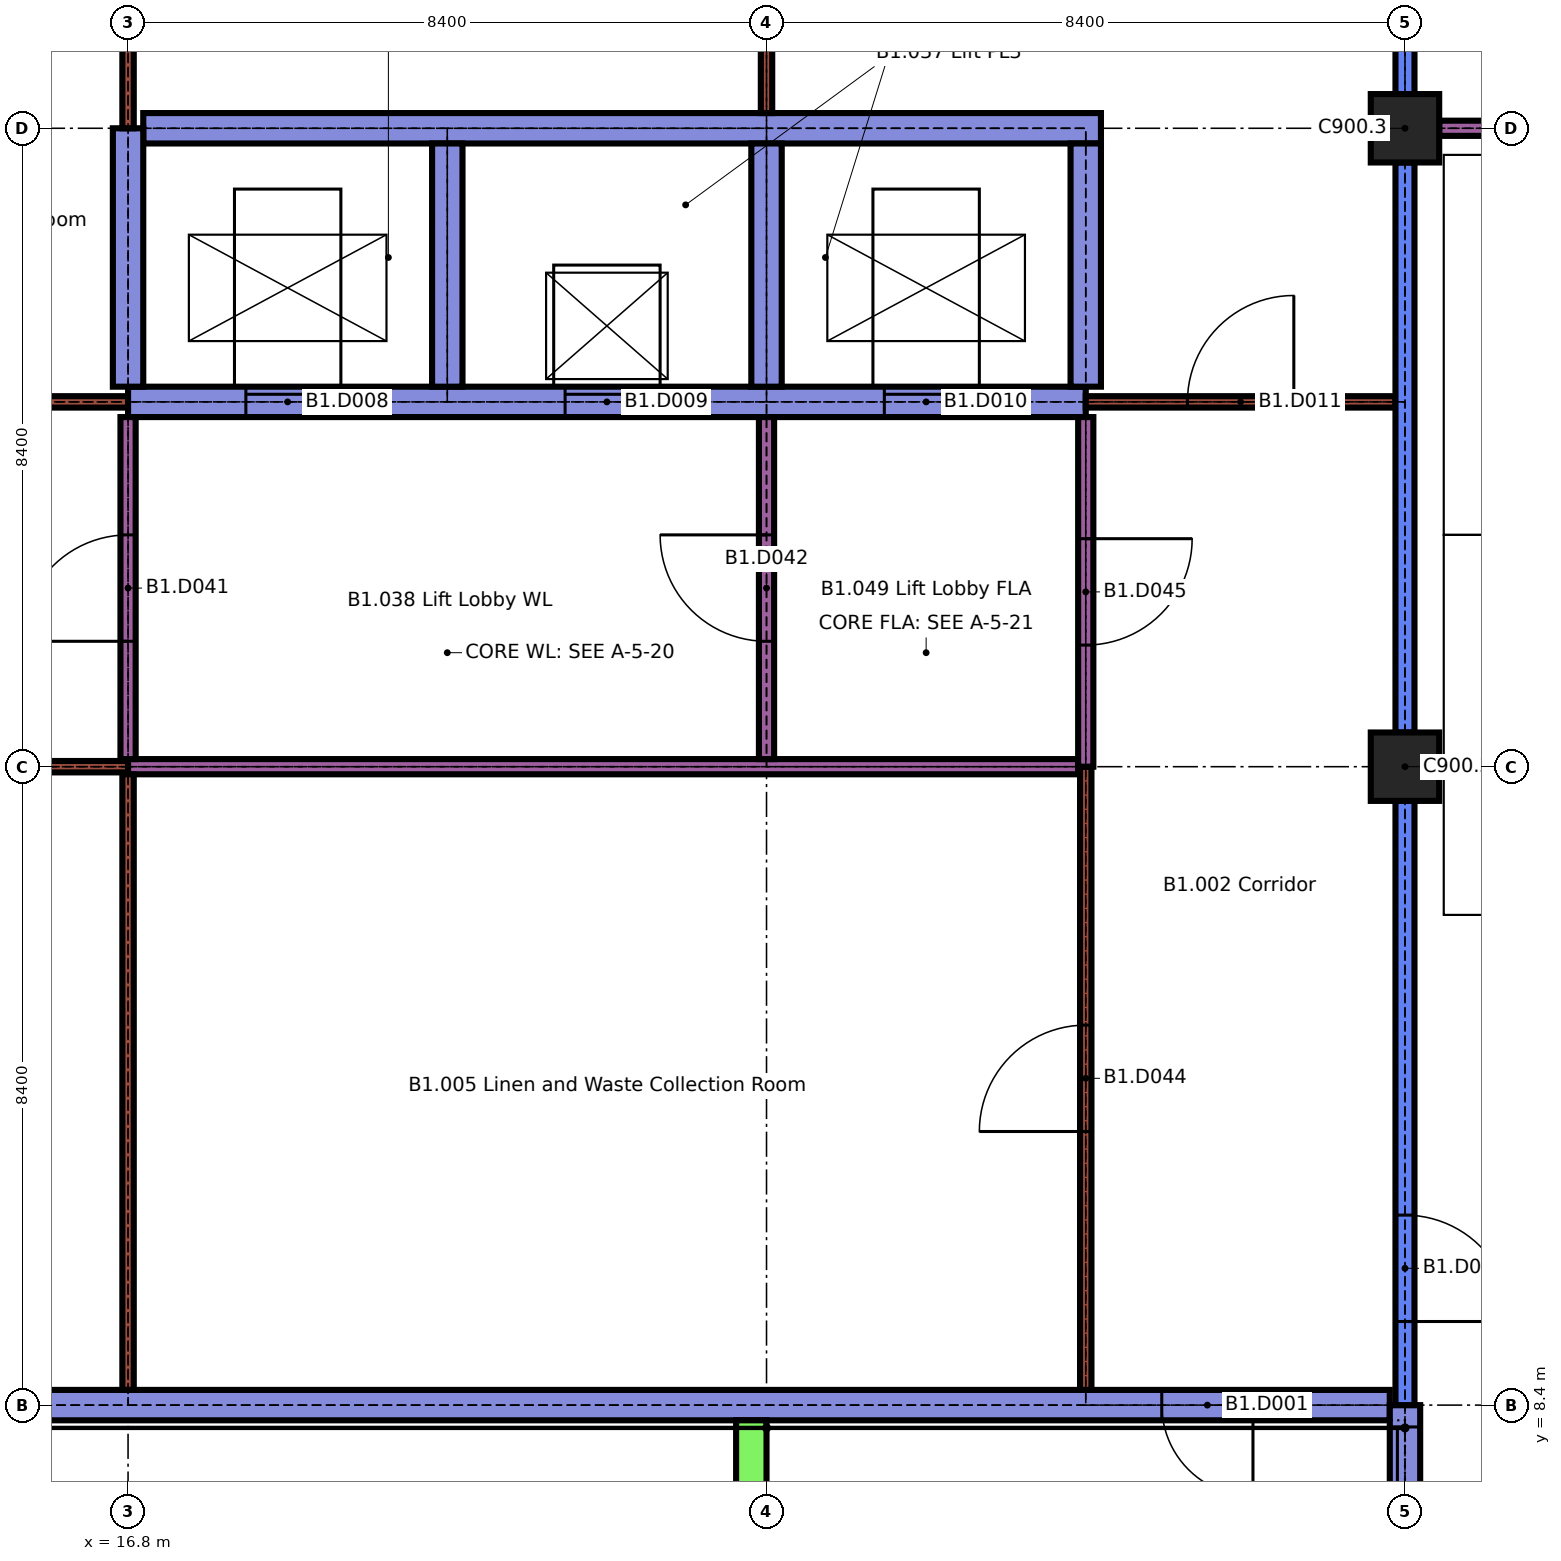
"""IFC4 building model, lengths in metres.
Left out: names, types, materials, properties, quantities, classifications, styles, units other than length and angle.
Written with IfcOpenShell. Run it as: python <this file> out.ifc"""

import sys

from ifc_helpers import new_model, si_unit, direction, frame, frame_2d, origin, origin_2d, place, context, subcontext, project, spatial, rectangle, extrude, element, fill, save


model = new_model("IFC4")
c1 = context("Model", 3, precision=1e-05, world=origin(), true_north=direction((0.0, 1.0)))
c2 = subcontext(c1, "Body", "Model", "MODEL_VIEW")
j1 = project(units=[si_unit("LENGTHUNIT", "METRE"), si_unit("PLANEANGLEUNIT", "RADIAN")], contexts=[c1])
p1 = place(None, origin())
s1 = spatial("IfcSite", under=j1, at=p1, CompositionType="ELEMENT")
p2 = place(p1, origin())
s2 = spatial("IfcBuilding", under=s1, at=p2, CompositionType="ELEMENT")
p3 = place(p2, frame((0.0, 0.0, -4.2)))
s3 = spatial("IfcBuildingStorey", under=s2, at=p3, CompositionType="ELEMENT", Elevation=-4.2)
for number, where, z_axis, x_axis in (
    (1, (33.6, 16.8, 0.0), (0.0, 0.0, 1.0), (1.0, 0.0, 0.0)),
    (2, (33.6, 25.2, 0.0), (0.0, 0.0, 1.0), (1.0, 0.0, 0.0)),
):
    element("IfcColumn", number, at=place(p3, frame(where, z_axis=z_axis, x_axis=x_axis)), inside=s3, PredefinedType="COLUMN", context=c2, shape_type="SweptSolid", body=[
        extrude(rectangle(XDim=0.9, YDim=0.9, at=origin_2d()), origin(), (0.0, 0.0, 1.0), 3.75),
    ])
p4 = place(p3, frame((0.25, 8.4, 0.0), z_axis=(0.0, 0.0, 1.0), x_axis=(1.0, 0.0, 0.0)))
e3 = element("IfcWall", 3, at=p4, inside=s3, PredefinedType="SHEAR", context=c2, shape_type="SweptSolid", body=[
    extrude(rectangle(XDim=33.15, YDim=0.4, at=frame_2d((16.575, 0.0))), origin(), (0.0, 0.0, 1.0), 3.75),
])
p5 = place(p4, frame((30.15, 0.0, 0.0)))
e4 = element("IfcOpeningElement", 4, at=p5, cuts=e3, PredefinedType="OPENING", context=c2, shape_type="SweptSolid", body=[
    extrude(rectangle(XDim=1.2, YDim=3.0, at=frame_2d((0.6, 1.5))), frame((0.0, 0.21, 0.0), z_axis=(0.0, -1.0, 0.0), x_axis=(1.0, 0.0, 0.0)), (0.0, 0.0, 1.0), 0.42),
])
p6 = place(p3, frame((8.85, 16.8, 0.0), z_axis=(0.0, 0.0, 1.0), x_axis=(1.0, 0.0, 0.0)))
e5 = element("IfcWall", 5, at=p6, inside=s3, PredefinedType="PARTITIONING", context=c2, shape_type="SweptSolid", body=[
    extrude(rectangle(XDim=7.95, YDim=0.15, at=frame_2d((3.975, 0.0))), origin(), (0.0, 0.0, 1.0), 3.75),
])
p7 = place(p6, frame((3.275, 0.0, 0.0)))
e6 = element("IfcOpeningElement", 6, at=p7, cuts=e5, PredefinedType="OPENING", context=c2, shape_type="SweptSolid", body=[
    extrude(rectangle(XDim=1.4, YDim=2.1, at=frame_2d((0.7, 1.05))), frame((0.0, 0.085, 0.0), z_axis=(0.0, -1.0, 0.0), x_axis=(1.0, 0.0, 0.0)), (0.0, 0.0, 1.0), 0.17),
])
p8 = place(p3, frame((16.8, 16.8, 0.0), z_axis=(0.0, 0.0, 1.0), x_axis=(1.0, 0.0, 0.0)))
e7 = element("IfcWall", 7, at=p8, inside=s3, PredefinedType="PARTITIONING", context=c2, shape_type="SweptSolid", body=[
    extrude(rectangle(XDim=12.5, YDim=0.2, at=frame_2d((6.25, 0.0))), origin(), (0.0, 0.0, 1.0), 3.75),
])
p9 = place(p3, frame((8.325, 21.6, 0.0), z_axis=(0.0, 0.0, 1.0), x_axis=(1.0, 0.0, 0.0)))
e8 = element("IfcWall", 8, at=p9, inside=s3, PredefinedType="PARTITIONING", context=c2, shape_type="SweptSolid", body=[
    extrude(rectangle(XDim=8.475, YDim=0.15, at=frame_2d((4.238, 0.0))), origin(), (0.0, 0.0, 1.0), 3.75),
])
p10 = place(p3, frame((16.8, 21.6, 0.0), z_axis=(0.0, 0.0, 1.0), x_axis=(1.0, 0.0, 0.0)))
e9 = element("IfcWall", 9, at=p10, inside=s3, PredefinedType="SHEAR", context=c2, shape_type="SweptSolid", body=[
    extrude(rectangle(XDim=12.6, YDim=0.4, at=frame_2d((6.3, 0.0))), origin(), (0.0, 0.0, 1.0), 3.75),
])
p11 = place(p10, frame((1.55, 0.0, 0.0)))
e10 = element("IfcOpeningElement", 10, at=p11, cuts=e9, PredefinedType="OPENING", context=c2, shape_type="SweptSolid", body=[
    extrude(rectangle(XDim=1.1, YDim=2.1, at=frame_2d((0.55, 1.05))), frame((0.0, 0.21, 0.0), z_axis=(0.0, -1.0, 0.0), x_axis=(1.0, 0.0, 0.0)), (0.0, 0.0, 1.0), 0.42),
])
p12 = place(p10, frame((5.75, 0.0, 0.0)))
e11 = element("IfcOpeningElement", 11, at=p12, cuts=e9, PredefinedType="OPENING", context=c2, shape_type="SweptSolid", body=[
    extrude(rectangle(XDim=1.1, YDim=2.1, at=frame_2d((0.55, 1.05))), frame((0.0, 0.21, 0.0), z_axis=(0.0, -1.0, 0.0), x_axis=(1.0, 0.0, 0.0)), (0.0, 0.0, 1.0), 0.42),
])
p13 = place(p10, frame((9.95, 0.0, 0.0)))
e12 = element("IfcOpeningElement", 12, at=p13, cuts=e9, PredefinedType="OPENING", context=c2, shape_type="SweptSolid", body=[
    extrude(rectangle(XDim=1.1, YDim=2.1, at=frame_2d((0.55, 1.05))), frame((0.0, 0.21, 0.0), z_axis=(0.0, -1.0, 0.0), x_axis=(1.0, 0.0, 0.0)), (0.0, 0.0, 1.0), 0.42),
])
p14 = place(p3, frame((29.4, 21.6, 0.0), z_axis=(0.0, 0.0, 1.0), x_axis=(1.0, 0.0, 0.0)))
e13 = element("IfcWall", 13, at=p14, inside=s3, PredefinedType="PARTITIONING", context=c2, shape_type="SweptSolid", body=[
    extrude(rectangle(XDim=4.075, YDim=0.15, at=frame_2d((2.038, 0.0))), origin(), (0.0, 0.0, 1.0), 3.75),
])
p15 = place(p14, frame((1.337, 0.0, 0.0)))
e14 = element("IfcOpeningElement", 14, at=p15, cuts=e13, PredefinedType="OPENING", context=c2, shape_type="SweptSolid", body=[
    extrude(rectangle(XDim=1.4, YDim=2.1, at=frame_2d((0.7, 1.05))), frame((0.0, 0.085, 0.0), z_axis=(0.0, -1.0, 0.0), x_axis=(1.0, 0.0, 0.0)), (0.0, 0.0, 1.0), 0.17),
])
p16 = place(p3, frame((17.0, 25.2, 0.0), z_axis=(0.0, 0.0, 1.0), x_axis=(1.0, 0.0, 0.0)))
e15 = element("IfcWall", 15, at=p16, inside=s3, PredefinedType="SHEAR", context=c2, shape_type="SweptSolid", body=[
    extrude(rectangle(XDim=12.6, YDim=0.4, at=frame_2d((6.3, 0.0))), origin(), (0.0, 0.0, 1.0), 3.75),
])
p17 = place(p3, frame((34.05, 25.2, 0.0), z_axis=(0.0, 0.0, 1.0), x_axis=(1.0, 0.0, 0.0)))
e16 = element("IfcWall", 16, at=p17, inside=s3, PredefinedType="PARTITIONING", context=c2, shape_type="SweptSolid", body=[
    extrude(rectangle(XDim=7.5, YDim=0.2, at=frame_2d((3.75, 0.0))), origin(), (0.0, 0.0, 1.0), 3.75),
])
p18 = place(p17, frame((3.05, 0.0, 0.0)))
e17 = element("IfcOpeningElement", 17, at=p18, cuts=e16, PredefinedType="OPENING", context=c2, shape_type="SweptSolid", body=[
    extrude(rectangle(XDim=1.4, YDim=2.1, at=frame_2d((0.7, 1.05))), frame((0.0, 0.11, 0.0), z_axis=(0.0, -1.0, 0.0), x_axis=(1.0, 0.0, 0.0)), (0.0, 0.0, 1.0), 0.22),
])
p19 = place(p3, frame((16.8, 8.6, 0.0), z_axis=(0.0, 0.0, 1.0), x_axis=(0.0, 1.0, 0.0)))
e18 = element("IfcWall", 18, at=p19, inside=s3, PredefinedType="PARTITIONING", context=c2, shape_type="SweptSolid", body=[
    extrude(rectangle(XDim=8.1, YDim=0.15, at=frame_2d((4.05, 0.0))), origin(), (0.0, 0.0, 1.0), 3.75),
])
p20 = place(p3, frame((16.8, 16.9, 0.0), z_axis=(0.0, 0.0, 1.0), x_axis=(0.0, 1.0, 0.0)))
e19 = element("IfcWall", 19, at=p20, inside=s3, PredefinedType="PARTITIONING", context=c2, shape_type="SweptSolid", body=[
    extrude(rectangle(XDim=4.5, YDim=0.2, at=frame_2d((2.25, 0.0))), origin(), (0.0, 0.0, 1.0), 3.75),
])
p21 = place(p20, frame((1.55, 0.0, 0.0)))
e20 = element("IfcOpeningElement", 20, at=p21, cuts=e19, PredefinedType="OPENING", context=c2, shape_type="SweptSolid", body=[
    extrude(rectangle(XDim=1.4, YDim=2.1, at=frame_2d((0.7, 1.05))), frame((0.0, 0.11, 0.0), z_axis=(0.0, -1.0, 0.0), x_axis=(1.0, 0.0, 0.0)), (0.0, 0.0, 1.0), 0.22),
])
p22 = place(p3, frame((16.8, 21.8, 0.0), z_axis=(0.0, 0.0, 1.0), x_axis=(0.0, 1.0, 0.0)))
e21 = element("IfcWall", 21, at=p22, inside=s3, PredefinedType="SHEAR", context=c2, shape_type="SweptSolid", body=[
    extrude(rectangle(XDim=3.4, YDim=0.4, at=frame_2d((1.7, 0.0))), origin(), (0.0, 0.0, 1.0), 3.75),
])
p23 = place(p3, frame((16.8, 25.2, 0.0), z_axis=(0.0, 0.0, 1.0), x_axis=(0.0, 1.0, 0.0)))
e22 = element("IfcWall", 22, at=p23, inside=s3, PredefinedType="PARTITIONING", context=c2, shape_type="SweptSolid", body=[
    extrude(rectangle(XDim=7.95, YDim=0.15, at=frame_2d((3.975, 0.0))), origin(), (0.0, 0.0, 1.0), 3.75),
])
p24 = place(p3, frame((21.0, 21.8, 0.0), z_axis=(0.0, 0.0, 1.0), x_axis=(0.0, 1.0, 0.0)))
e23 = element("IfcWall", 23, at=p24, inside=s3, PredefinedType="SHEAR", context=c2, shape_type="SweptSolid", body=[
    extrude(rectangle(XDim=3.2, YDim=0.4, at=frame_2d((1.6, 0.0))), origin(), (0.0, 0.0, 1.0), 3.75),
])
p25 = place(p3, frame((25.2, 16.9, 0.0), z_axis=(0.0, 0.0, 1.0), x_axis=(0.0, 1.0, 0.0)))
e24 = element("IfcWall", 24, at=p25, inside=s3, PredefinedType="PARTITIONING", context=c2, shape_type="SweptSolid", body=[
    extrude(rectangle(XDim=4.5, YDim=0.2, at=frame_2d((2.25, 0.0))), origin(), (0.0, 0.0, 1.0), 3.75),
])
p26 = place(p25, frame((1.55, 0.0, 0.0)))
e25 = element("IfcOpeningElement", 25, at=p26, cuts=e24, PredefinedType="OPENING", context=c2, shape_type="SweptSolid", body=[
    extrude(rectangle(XDim=1.4, YDim=2.1, at=frame_2d((0.7, 1.05))), frame((0.0, 0.11, 0.0), z_axis=(0.0, -1.0, 0.0), x_axis=(1.0, 0.0, 0.0)), (0.0, 0.0, 1.0), 0.22),
])
p27 = place(p3, frame((25.2, 21.8, 0.0), z_axis=(0.0, 0.0, 1.0), x_axis=(0.0, 1.0, 0.0)))
e26 = element("IfcWall", 26, at=p27, inside=s3, PredefinedType="SHEAR", context=c2, shape_type="SweptSolid", body=[
    extrude(rectangle(XDim=3.2, YDim=0.4, at=frame_2d((1.6, 0.0))), origin(), (0.0, 0.0, 1.0), 3.75),
])
p28 = place(p3, frame((25.2, 25.4, 0.0), z_axis=(0.0, 0.0, 1.0), x_axis=(0.0, 1.0, 0.0)))
e27 = element("IfcWall", 27, at=p28, inside=s3, PredefinedType="PARTITIONING", context=c2, shape_type="SweptSolid", body=[
    extrude(rectangle(XDim=7.75, YDim=0.15, at=frame_2d((3.875, 0.0))), origin(), (0.0, 0.0, 1.0), 3.75),
])
p29 = place(p28, frame((3.175, 0.0, 0.0)))
e28 = element("IfcOpeningElement", 28, at=p29, cuts=e27, PredefinedType="OPENING", context=c2, shape_type="SweptSolid", body=[
    extrude(rectangle(XDim=1.4, YDim=2.1, at=frame_2d((0.7, 1.05))), frame((0.0, 0.085, 0.0), z_axis=(0.0, -1.0, 0.0), x_axis=(1.0, 0.0, 0.0)), (0.0, 0.0, 1.0), 0.17),
])
p30 = place(p3, frame((29.4, 8.6, 0.0), z_axis=(0.0, 0.0, 1.0), x_axis=(0.0, 1.0, 0.0)))
e29 = element("IfcWall", 29, at=p30, inside=s3, PredefinedType="PARTITIONING", context=c2, shape_type="SweptSolid", body=[
    extrude(rectangle(XDim=8.2, YDim=0.15, at=frame_2d((4.1, 0.0))), origin(), (0.0, 0.0, 1.0), 3.75),
])
p31 = place(p30, frame((3.4, 0.0, 0.0)))
e30 = element("IfcOpeningElement", 30, at=p31, cuts=e29, PredefinedType="OPENING", context=c2, shape_type="SweptSolid", body=[
    extrude(rectangle(XDim=1.4, YDim=2.1, at=frame_2d((0.7, 1.05))), frame((0.0, 0.085, 0.0), z_axis=(0.0, -1.0, 0.0), x_axis=(1.0, 0.0, 0.0)), (0.0, 0.0, 1.0), 0.17),
])
p32 = place(p3, frame((29.4, 16.8, 0.0), z_axis=(0.0, 0.0, 1.0), x_axis=(0.0, 1.0, 0.0)))
e31 = element("IfcWall", 31, at=p32, inside=s3, PredefinedType="PARTITIONING", context=c2, shape_type="SweptSolid", body=[
    extrude(rectangle(XDim=4.6, YDim=0.2, at=frame_2d((2.3, 0.0))), origin(), (0.0, 0.0, 1.0), 3.75),
])
p33 = place(p32, frame((1.6, 0.0, 0.0)))
e32 = element("IfcOpeningElement", 32, at=p33, cuts=e31, PredefinedType="OPENING", context=c2, shape_type="SweptSolid", body=[
    extrude(rectangle(XDim=1.4, YDim=2.1, at=frame_2d((0.7, 1.05))), frame((0.0, 0.11, 0.0), z_axis=(0.0, -1.0, 0.0), x_axis=(1.0, 0.0, 0.0)), (0.0, 0.0, 1.0), 0.22),
])
p34 = place(p3, frame((29.4, 21.8, 0.0), z_axis=(0.0, 0.0, 1.0), x_axis=(0.0, 1.0, 0.0)))
e33 = element("IfcWall", 33, at=p34, inside=s3, PredefinedType="SHEAR", context=c2, shape_type="SweptSolid", body=[
    extrude(rectangle(XDim=3.2, YDim=0.4, at=frame_2d((1.6, 0.0))), origin(), (0.0, 0.0, 1.0), 3.75),
])
p35 = place(p3, frame((33.6, 0.25, 0.0), z_axis=(0.0, 0.0, 1.0), x_axis=(0.0, 1.0, 0.0)))
e34 = element("IfcWall", 34, at=p35, inside=s3, PredefinedType="SHEAR", context=c2, shape_type="SweptSolid", body=[
    extrude(rectangle(XDim=8.15, YDim=0.4, at=frame_2d((4.075, 0.0))), origin(), (0.0, 0.0, 1.0), 3.75),
])
p36 = place(p35, frame((0.288, 0.0, 0.0)))
e35 = element("IfcOpeningElement", 35, at=p36, cuts=e34, PredefinedType="OPENING", context=c2, shape_type="SweptSolid", body=[
    extrude(rectangle(XDim=3.5, YDim=3.0, at=frame_2d((1.75, 1.5))), frame((0.0, 0.21, 0.0), z_axis=(0.0, -1.0, 0.0), x_axis=(1.0, 0.0, 0.0)), (0.0, 0.0, 1.0), 0.42),
])
p37 = place(p35, frame((4.363, 0.0, 0.0)))
e36 = element("IfcOpeningElement", 36, at=p37, cuts=e34, PredefinedType="OPENING", context=c2, shape_type="SweptSolid", body=[
    extrude(rectangle(XDim=3.5, YDim=3.0, at=frame_2d((1.75, 1.5))), frame((0.0, 0.21, 0.0), z_axis=(0.0, -1.0, 0.0), x_axis=(1.0, 0.0, 0.0)), (0.0, 0.0, 1.0), 0.42),
])
p38 = place(p3, frame((33.6, 8.4, 0.0), z_axis=(0.0, 0.0, 1.0), x_axis=(0.0, 1.0, 0.0)))
e37 = element("IfcWall", 37, at=p38, inside=s3, PredefinedType="SOLIDWALL", context=c2, shape_type="SweptSolid", body=[
    extrude(rectangle(XDim=7.95, YDim=0.25, at=frame_2d((3.975, 0.0))), origin(), (0.0, 0.0, 1.0), 3.75),
])
p39 = place(p38, frame((1.1, 0.0, 0.0)))
e38 = element("IfcOpeningElement", 38, at=p39, cuts=e37, PredefinedType="OPENING", context=c2, shape_type="SweptSolid", body=[
    extrude(rectangle(XDim=1.4, YDim=2.1, at=frame_2d((0.7, 1.05))), frame((0.0, 0.135, 0.0), z_axis=(0.0, -1.0, 0.0), x_axis=(1.0, 0.0, 0.0)), (0.0, 0.0, 1.0), 0.27),
])
for number, where, z_axis, x_axis in (
    (39, (33.6, 17.25, 0.0), (0.0, 0.0, 1.0), (0.0, 1.0, 0.0)),
    (40, (33.6, 25.65, 0.0), (0.0, 0.0, 1.0), (0.0, 1.0, 0.0)),
):
    element("IfcWall", number, at=place(p3, frame(where, z_axis=z_axis, x_axis=x_axis)), inside=s3, PredefinedType="SOLIDWALL", context=c2, shape_type="SweptSolid", body=[
        extrude(rectangle(XDim=7.5, YDim=0.25, at=frame_2d((3.75, 0.0))), origin(), (0.0, 0.0, 1.0), 3.75),
    ])
p40 = place(p3, frame((25.0, 0.2, 0.0), z_axis=(0.0, 0.0, 1.0), x_axis=(0.0, 1.0, 0.0)))
e41 = element("IfcWall", 41, at=p40, inside=s3, PredefinedType="SOLIDWALL", context=c2, shape_type="SweptSolid", body=[
    extrude(rectangle(XDim=8.0, YDim=0.4, at=frame_2d((4.0, 0.0))), origin(), (0.0, 0.0, 1.0), 0.299),
])
p41 = place(p5, origin())
e42 = element("IfcDoor", 42, at=p41, inside=s3, OperationType="SINGLE_SWING_RIGHT", PredefinedType="DOOR", context=c2, shape_type="SweptSolid", body=[
    extrude(rectangle(XDim=1.2, YDim=3.0, at=frame_2d((0.6, 1.5))), frame((0.0, 0.025, 0.0), z_axis=(0.0, -1.0, 0.0), x_axis=(1.0, 0.0, 0.0)), (0.0, 0.0, 1.0), 0.05),
])
fill(e4, e42)
p42 = place(p11, origin())
e43 = element("IfcDoor", 43, at=p42, inside=s3, OperationType="SLIDING_TO_LEFT", PredefinedType="DOOR", context=c2, shape_type="SweptSolid", body=[
    extrude(rectangle(XDim=1.1, YDim=2.1, at=frame_2d((0.55, 1.05))), frame((0.0, 0.025, 0.0), z_axis=(0.0, -1.0, 0.0), x_axis=(1.0, 0.0, 0.0)), (0.0, 0.0, 1.0), 0.05),
])
fill(e10, e43)
p43 = place(p12, origin())
e44 = element("IfcDoor", 44, at=p43, inside=s3, OperationType="SLIDING_TO_LEFT", PredefinedType="DOOR", context=c2, shape_type="SweptSolid", body=[
    extrude(rectangle(XDim=1.1, YDim=2.1, at=frame_2d((0.55, 1.05))), frame((0.0, 0.025, 0.0), z_axis=(0.0, -1.0, 0.0), x_axis=(1.0, 0.0, 0.0)), (0.0, 0.0, 1.0), 0.05),
])
fill(e11, e44)
p44 = place(p13, origin())
e45 = element("IfcDoor", 45, at=p44, inside=s3, OperationType="SLIDING_TO_LEFT", PredefinedType="DOOR", context=c2, shape_type="SweptSolid", body=[
    extrude(rectangle(XDim=1.1, YDim=2.1, at=frame_2d((0.55, 1.05))), frame((0.0, 0.025, 0.0), z_axis=(0.0, -1.0, 0.0), x_axis=(1.0, 0.0, 0.0)), (0.0, 0.0, 1.0), 0.05),
])
fill(e12, e45)
p45 = place(p15, origin())
e46 = element("IfcDoor", 46, at=p45, inside=s3, OperationType="SINGLE_SWING_LEFT", PredefinedType="DOOR", context=c2, shape_type="SweptSolid", body=[
    extrude(rectangle(XDim=1.4, YDim=2.1, at=frame_2d((0.7, 1.05))), frame((0.0, 0.025, 0.0), z_axis=(0.0, -1.0, 0.0), x_axis=(1.0, 0.0, 0.0)), (0.0, 0.0, 1.0), 0.05),
])
fill(e14, e46)
p46 = place(p21, origin())
e47 = element("IfcDoor", 47, at=p46, inside=s3, OperationType="SINGLE_SWING_RIGHT", PredefinedType="DOOR", context=c2, shape_type="SweptSolid", body=[
    extrude(rectangle(XDim=1.4, YDim=2.1, at=frame_2d((0.7, 1.05))), frame((0.0, 0.03, 0.0), z_axis=(0.0, -1.0, 0.0), x_axis=(1.0, 0.0, 0.0)), (0.0, 0.0, 1.0), 0.06),
])
fill(e20, e47)
p47 = place(p26, origin())
e48 = element("IfcDoor", 48, at=p47, inside=s3, OperationType="SINGLE_SWING_LEFT", PredefinedType="DOOR", context=c2, shape_type="SweptSolid", body=[
    extrude(rectangle(XDim=1.4, YDim=2.1, at=frame_2d((0.7, 1.05))), frame((0.0, 0.025, 0.0), z_axis=(0.0, -1.0, 0.0), x_axis=(1.0, 0.0, 0.0)), (0.0, 0.0, 1.0), 0.05),
])
fill(e25, e48)
p48 = place(p31, origin())
e49 = element("IfcDoor", 49, at=p48, inside=s3, OperationType="SINGLE_SWING_RIGHT", PredefinedType="DOOR", context=c2, shape_type="SweptSolid", body=[
    extrude(rectangle(XDim=1.4, YDim=2.1, at=frame_2d((0.7, 1.05))), frame((0.0, 0.025, 0.0), z_axis=(0.0, -1.0, 0.0), x_axis=(1.0, 0.0, 0.0)), (0.0, 0.0, 1.0), 0.05),
])
fill(e30, e49)
p49 = place(p33, origin())
e50 = element("IfcDoor", 50, at=p49, inside=s3, OperationType="SINGLE_SWING_RIGHT", PredefinedType="DOOR", context=c2, shape_type="SweptSolid", body=[
    extrude(rectangle(XDim=1.4, YDim=2.1, at=frame_2d((0.7, 1.05))), frame((0.0, 0.03, 0.0), z_axis=(0.0, -1.0, 0.0), x_axis=(1.0, 0.0, 0.0)), (0.0, 0.0, 1.0), 0.06),
])
fill(e32, e50)
p50 = place(p37, origin())
e51 = element("IfcDoor", 51, at=p50, inside=s3, OperationType="ROLLINGUP", PredefinedType="GATE", context=c2, shape_type="SweptSolid", body=[
    extrude(rectangle(XDim=3.5, YDim=3.0, at=frame_2d((1.75, 1.5))), frame((0.0, 0.025, 0.0), z_axis=(0.0, -1.0, 0.0), x_axis=(1.0, 0.0, 0.0)), (0.0, 0.0, 1.0), 0.05),
])
fill(e36, e51)
p51 = place(p39, origin())
e52 = element("IfcDoor", 52, at=p51, inside=s3, OperationType="SINGLE_SWING_LEFT", PredefinedType="DOOR", context=c2, shape_type="SweptSolid", body=[
    extrude(rectangle(XDim=1.4, YDim=2.1, at=frame_2d((0.7, 1.05))), frame((0.0, 0.025, 0.0), z_axis=(0.0, -1.0, 0.0), x_axis=(1.0, 0.0, 0.0)), (0.0, 0.0, 1.0), 0.05),
])
fill(e38, e52)
save(model, sys.argv[1])
